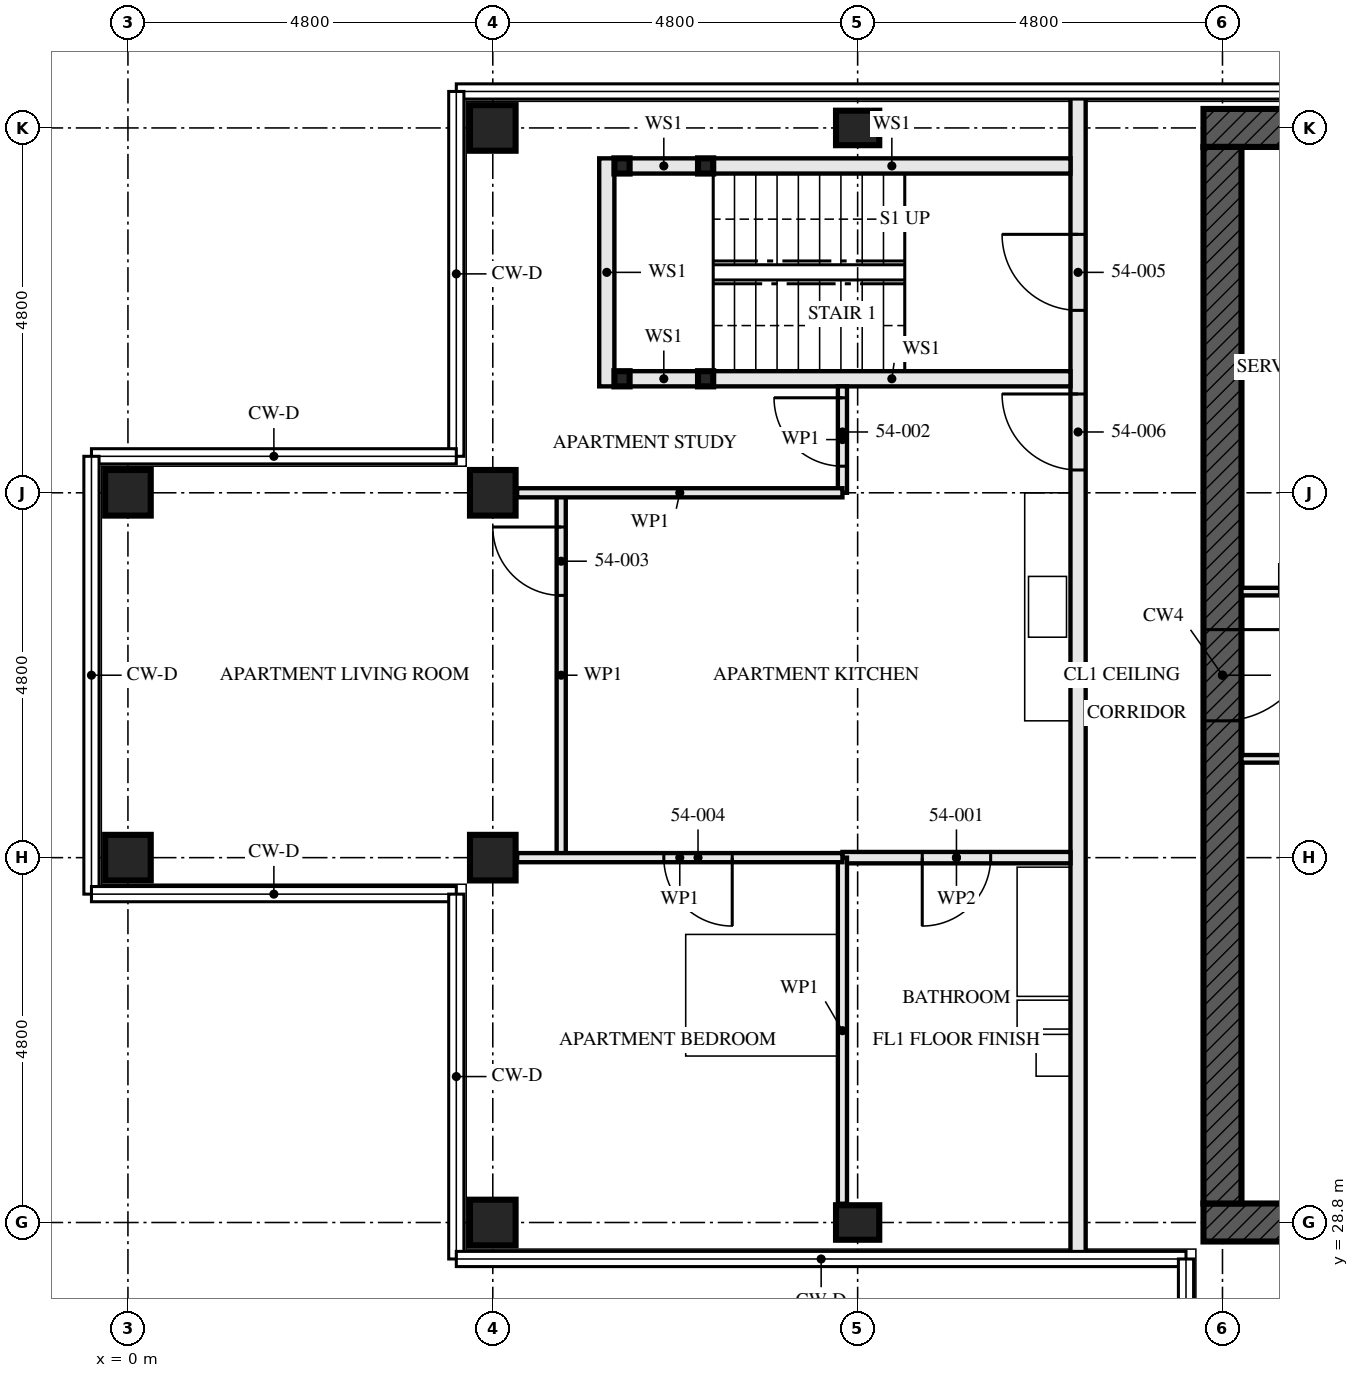
"""IFC4 building model, lengths in metres.
Left out: names, types, materials, properties, quantities, classifications, styles, units other than length and angle.
Written with IfcOpenShell. Run it as: python <this file> out.ifc"""

import sys

from ifc_helpers import new_model, si_unit, direction, frame, frame_2d, origin, origin_2d, place, context, subcontext, project, spatial, rectangle, hollow_rectangle, i_section, extrude, element, fill, save


model = new_model("IFC4")
c1 = context("Model", 3, precision=1e-05, world=origin(), true_north=direction((0.0, 1.0)))
c2 = subcontext(c1, "Body", "Model", "MODEL_VIEW")
j1 = project(units=[si_unit("LENGTHUNIT", "METRE"), si_unit("PLANEANGLEUNIT", "RADIAN")], contexts=[c1])
p1 = place(None, origin())
s1 = spatial("IfcSite", under=j1, at=p1, CompositionType="ELEMENT")
p2 = place(p1, origin())
s2 = spatial("IfcBuilding", under=s1, at=p2, CompositionType="ELEMENT")
p3 = place(p2, frame((0.0, 0.0, 198.0)))
s3 = spatial("IfcBuildingStorey", under=s2, at=p3, CompositionType="ELEMENT", Elevation=198.0)
for number, where, z_axis, x_axis in (
    (1, (0.0, 33.6, 0.0), (0.0, 0.0, 1.0), (0.0, 1.0, 0.0)),
    (2, (0.0, 38.4, 0.0), (0.0, 0.0, 1.0), (0.0, 1.0, 0.0)),
    (3, (4.8, 28.8, 0.0), (0.0, 0.0, 1.0), (0.0, 1.0, 0.0)),
    (4, (4.8, 33.6, 0.0), (0.0, 0.0, 1.0), (0.0, 1.0, 0.0)),
    (5, (4.8, 38.4, 0.0), (0.0, 0.0, 1.0), (0.0, 1.0, 0.0)),
    (6, (4.8, 43.2, 0.0), (0.0, 0.0, 1.0), (0.0, 1.0, 0.0)),
):
    element("IfcColumn", number, at=place(p3, frame(where, z_axis=z_axis, x_axis=x_axis)), inside=s3, PredefinedType="COLUMN", context=c2, shape_type="SweptSolid", body=[
        extrude(hollow_rectangle(XDim=0.6, YDim=0.6, WallThickness=0.05, at=origin_2d()), origin(), (0.0, 0.0, 1.0), 3.5),
    ])
for number, where, z_axis, x_axis in (
    (7, (9.6, 28.8, 0.0), (0.0, 0.0, 1.0), (0.0, 1.0, 0.0)),
    (8, (9.6, 43.2, 0.0), (0.0, 0.0, 1.0), (0.0, 1.0, 0.0)),
):
    element("IfcColumn", number, at=place(p3, frame(where, z_axis=z_axis, x_axis=x_axis)), inside=s3, PredefinedType="COLUMN", context=c2, shape_type="SweptSolid", body=[
        extrude(i_section(OverallWidth=0.454, OverallDepth=0.569, WebThickness=0.078, FlangeThickness=0.125, FilletRadius=0.015, at=origin_2d()), origin(), (0.0, 0.0, 1.0), 3.5),
    ])
p4 = place(p3, frame((14.15, 28.8, -0.17), z_axis=(0.0, 0.0, 1.0), x_axis=(1.0, 0.0, 0.0)))
e9 = element("IfcWall", 9, at=p4, inside=s3, PredefinedType="SHEAR", context=c2, shape_type="SweptSolid", body=[
    extrude(rectangle(XDim=14.9, YDim=0.5, at=frame_2d((7.45, 0.0))), origin(), (0.0, 0.0, 1.0), 3.5),
])
p5 = place(p4, frame((6.85, 0.0, 0.17)))
e10 = element("IfcOpeningElement", 10, at=p5, cuts=e9, PredefinedType="OPENING", context=c2, shape_type="SweptSolid", body=[
    extrude(rectangle(XDim=1.2, YDim=2.1, at=frame_2d((0.6, 1.05))), frame((0.0, 0.26, 0.0), z_axis=(0.0, -1.0, 0.0), x_axis=(1.0, 0.0, 0.0)), (0.0, 0.0, 1.0), 0.521),
])
p6 = place(p3, frame((29.05, 43.2, -0.17), z_axis=(0.0, 0.0, 1.0), x_axis=(-1.0, 0.0, 0.0)))
e11 = element("IfcWall", 11, at=p6, inside=s3, PredefinedType="SHEAR", context=c2, shape_type="SweptSolid", body=[
    extrude(rectangle(XDim=14.9, YDim=0.5, at=frame_2d((7.45, 0.0))), origin(), (0.0, 0.0, 1.0), 3.5),
])
p7 = place(p3, frame((14.4, 42.95, -0.17), z_axis=(0.0, 0.0, 1.0), x_axis=(0.0, -1.0, 0.0)))
e12 = element("IfcWall", 12, at=p7, inside=s3, PredefinedType="SHEAR", context=c2, shape_type="SweptSolid", body=[
    extrude(rectangle(XDim=13.9, YDim=0.5, at=frame_2d((6.95, 0.0))), origin(), (0.0, 0.0, 1.0), 3.5),
])
p8 = place(p7, frame((6.35, 0.0, 0.17)))
e13 = element("IfcOpeningElement", 13, at=p8, cuts=e12, PredefinedType="OPENING", context=c2, shape_type="SweptSolid", body=[
    extrude(rectangle(XDim=1.2, YDim=2.1, at=frame_2d((0.6, 1.05))), frame((0.0, 0.26, 0.0), z_axis=(0.0, -1.0, 0.0), x_axis=(1.0, 0.0, 0.0)), (0.0, 0.0, 1.0), 0.521),
])
for number, where, z_axis, x_axis in (
    (14, (6.5, 42.7, 0.0), (0.0, 0.0, 1.0), (1.0, 0.0, 0.0)),
    (15, (6.5, 39.9, 0.0), (0.0, 0.0, 1.0), (1.0, 0.0, 0.0)),
    (16, (7.6, 42.7, 0.0), (0.0, 0.0, 1.0), (1.0, 0.0, 0.0)),
    (17, (7.6, 39.9, 0.0), (0.0, 0.0, 1.0), (1.0, 0.0, 0.0)),
):
    element("IfcColumn", number, at=place(p3, frame(where, z_axis=z_axis, x_axis=x_axis)), inside=s3, PredefinedType="COLUMN", context=c2, shape_type="SweptSolid", body=[
        extrude(hollow_rectangle(XDim=0.2, YDim=0.2, WallThickness=0.008, at=origin_2d()), origin(), (0.0, 0.0, 1.0), 3.33),
    ])
p9 = place(p3, frame((6.6, 42.7, 0.0), z_axis=(0.0, 0.0, 1.0), x_axis=(1.0, 0.0, 0.0)))
e18 = element("IfcWall", 18, at=p9, inside=s3, PredefinedType="SOLIDWALL", context=c2, shape_type="SweptSolid", body=[
    extrude(rectangle(XDim=0.9, YDim=0.2, at=frame_2d((0.45, 0.0))), origin(), (0.0, 0.0, 1.0), 2.99),
])
p10 = place(p3, frame((7.7, 42.7, 0.0), z_axis=(0.0, 0.0, 1.0), x_axis=(1.0, 0.0, 0.0)))
e19 = element("IfcWall", 19, at=p10, inside=s3, PredefinedType="SOLIDWALL", context=c2, shape_type="SweptSolid", body=[
    extrude(rectangle(XDim=4.7, YDim=0.2, at=frame_2d((2.35, 0.0))), origin(), (0.0, 0.0, 1.0), 2.99),
])
p11 = place(p3, frame((6.6, 39.9, 0.0), z_axis=(0.0, 0.0, 1.0), x_axis=(1.0, 0.0, 0.0)))
e20 = element("IfcWall", 20, at=p11, inside=s3, PredefinedType="SOLIDWALL", context=c2, shape_type="SweptSolid", body=[
    extrude(rectangle(XDim=0.9, YDim=0.2, at=frame_2d((0.45, 0.0))), origin(), (0.0, 0.0, 1.0), 2.99),
])
p12 = place(p3, frame((7.7, 39.9, 0.0), z_axis=(0.0, 0.0, 1.0), x_axis=(1.0, 0.0, 0.0)))
e21 = element("IfcWall", 21, at=p12, inside=s3, PredefinedType="SOLIDWALL", context=c2, shape_type="SweptSolid", body=[
    extrude(rectangle(XDim=4.7, YDim=0.2, at=frame_2d((2.35, 0.0))), origin(), (0.0, 0.0, 1.0), 2.99),
])
p13 = place(p3, frame((6.3, 42.8, 0.0), z_axis=(0.0, 0.0, 1.0), x_axis=(0.0, -1.0, 0.0)))
e22 = element("IfcWall", 22, at=p13, inside=s3, PredefinedType="SOLIDWALL", context=c2, shape_type="SweptSolid", body=[
    extrude(rectangle(XDim=3.0, YDim=0.2, at=frame_2d((1.5, 0.0))), origin(), (0.0, 0.0, 1.0), 3.33),
])
p14 = place(p3, frame((9.4, 33.6, 0.0), z_axis=(0.0, 0.0, 1.0), x_axis=(1.0, 0.0, 0.0)))
e23 = element("IfcWall", 23, at=p14, inside=s3, PredefinedType="PARTITIONING", context=c2, shape_type="SweptSolid", body=[
    extrude(rectangle(XDim=3.0, YDim=0.15, at=frame_2d((1.5, 0.0))), origin(), (0.0, 0.0, 1.0), 2.55),
])
p15 = place(p14, frame((1.05, 0.0, 0.0)))
e24 = element("IfcOpeningElement", 24, at=p15, cuts=e23, PredefinedType="OPENING", context=c2, shape_type="SweptSolid", body=[
    extrude(rectangle(XDim=0.9, YDim=2.1, at=frame_2d((0.45, 1.05))), frame((0.0, 0.085, 0.0), z_axis=(0.0, -1.0, 0.0), x_axis=(1.0, 0.0, 0.0)), (0.0, 0.0, 1.0), 0.171),
])
p16 = place(p3, frame((9.4, 39.8, 0.0), z_axis=(0.0, 0.0, 1.0), x_axis=(0.0, -1.0, 0.0)))
e25 = element("IfcWall", 25, at=p16, inside=s3, PredefinedType="PARTITIONING", context=c2, shape_type="SweptSolid", body=[
    extrude(rectangle(XDim=1.4, YDim=0.12, at=frame_2d((0.7, 0.0))), origin(), (0.0, 0.0, 1.0), 3.33),
])
p17 = place(p16, frame((0.15, 0.0, 0.0)))
e26 = element("IfcOpeningElement", 26, at=p17, cuts=e25, PredefinedType="OPENING", context=c2, shape_type="SweptSolid", body=[
    extrude(rectangle(XDim=0.9, YDim=2.1, at=frame_2d((0.45, 1.05))), frame((0.0, 0.071, 0.0), z_axis=(0.0, -1.0, 0.0), x_axis=(1.0, 0.0, 0.0)), (0.0, 0.0, 1.0), 0.141),
])
p18 = place(p3, frame((5.7, 38.4, 0.0), z_axis=(0.0, 0.0, 1.0), x_axis=(0.0, -1.0, 0.0)))
e27 = element("IfcWall", 27, at=p18, inside=s3, PredefinedType="PARTITIONING", context=c2, shape_type="SweptSolid", body=[
    extrude(rectangle(XDim=4.8, YDim=0.12, at=frame_2d((2.4, 0.0))), origin(), (0.0, 0.0, 1.0), 3.33),
])
p19 = place(p18, frame((0.45, 0.0, 0.0)))
e28 = element("IfcOpeningElement", 28, at=p19, cuts=e27, PredefinedType="OPENING", context=c2, shape_type="SweptSolid", body=[
    extrude(rectangle(XDim=0.9, YDim=2.1, at=frame_2d((0.45, 1.05))), frame((0.0, 0.071, 0.0), z_axis=(0.0, -1.0, 0.0), x_axis=(1.0, 0.0, 0.0)), (0.0, 0.0, 1.0), 0.141),
])
p20 = place(p3, frame((9.4, 33.6, 0.0), z_axis=(0.0, 0.0, 1.0), x_axis=(0.0, -1.0, 0.0)))
e29 = element("IfcWall", 29, at=p20, inside=s3, PredefinedType="PARTITIONING", context=c2, shape_type="SweptSolid", body=[
    extrude(rectangle(XDim=4.553, YDim=0.12, at=frame_2d((2.276, 0.0))), origin(), (0.0, 0.0, 1.0), 3.33),
])
p21 = place(p3, frame((5.12, 38.4, 0.0), z_axis=(0.0, 0.0, 1.0), x_axis=(1.0, 0.0, 0.0)))
e30 = element("IfcWall", 30, at=p21, inside=s3, PredefinedType="PARTITIONING", context=c2, shape_type="SweptSolid", body=[
    extrude(rectangle(XDim=4.28, YDim=0.12, at=frame_2d((2.14, 0.0))), origin(), (0.0, 0.0, 1.0), 2.55),
])
p22 = place(p3, frame((5.12, 33.6, 0.0), z_axis=(0.0, 0.0, 1.0), x_axis=(1.0, 0.0, 0.0)))
e31 = element("IfcWall", 31, at=p22, inside=s3, PredefinedType="PARTITIONING", context=c2, shape_type="SweptSolid", body=[
    extrude(rectangle(XDim=4.28, YDim=0.12, at=frame_2d((2.14, 0.0))), origin(), (0.0, 0.0, 1.0), 2.55),
])
p23 = place(p22, frame((1.93, 0.0, 0.0)))
e32 = element("IfcOpeningElement", 32, at=p23, cuts=e31, PredefinedType="OPENING", context=c2, shape_type="SweptSolid", body=[
    extrude(rectangle(XDim=0.9, YDim=2.1, at=frame_2d((0.45, 1.05))), frame((0.0, 0.071, 0.0), z_axis=(0.0, -1.0, 0.0), x_axis=(1.0, 0.0, 0.0)), (0.0, 0.0, 1.0), 0.141),
])
p24 = place(p3, frame((12.5, 43.655, 0.0), z_axis=(0.0, 0.0, 1.0), x_axis=(0.0, -1.0, 0.0)))
e33 = element("IfcWall", 33, at=p24, inside=s3, PredefinedType="PARTITIONING", context=c2, shape_type="SweptSolid", body=[
    extrude(rectangle(XDim=15.31, YDim=0.2, at=frame_2d((7.655, 0.0))), origin(), (0.0, 0.0, 1.0), 2.32),
])
p25 = place(p24, frame((1.855, 0.0, 0.0)))
e34 = element("IfcOpeningElement", 34, at=p25, cuts=e33, PredefinedType="OPENING", context=c2, shape_type="SweptSolid", body=[
    extrude(rectangle(XDim=1.0, YDim=2.1, at=frame_2d((0.5, 1.05))), frame((0.0, 0.111, 0.0), z_axis=(0.0, -1.0, 0.0), x_axis=(1.0, 0.0, 0.0)), (0.0, 0.0, 1.0), 0.221),
])
p26 = place(p24, frame((3.955, 0.0, 0.0)))
e35 = element("IfcOpeningElement", 35, at=p26, cuts=e33, PredefinedType="OPENING", context=c2, shape_type="SweptSolid", body=[
    extrude(rectangle(XDim=1.0, YDim=2.1, at=frame_2d((0.5, 1.05))), frame((0.0, 0.111, 0.0), z_axis=(0.0, -1.0, 0.0), x_axis=(1.0, 0.0, 0.0)), (0.0, 0.0, 1.0), 0.221),
])
p27 = place(p3, frame((14.65, 34.9, 0.0), z_axis=(0.0, 0.0, 1.0), x_axis=(1.0, 0.0, 0.0)))
e36 = element("IfcWall", 36, at=p27, inside=s3, PredefinedType="SOLIDWALL", context=c2, shape_type="SweptSolid", body=[
    extrude(rectangle(XDim=5.9, YDim=0.1, at=frame_2d((2.95, 0.0))), origin(), (0.0, 0.0, 1.0), 3.33),
])
p28 = place(p27, frame((1.6, 0.0, 0.0)))
e37 = element("IfcOpeningElement", 37, at=p28, cuts=e36, PredefinedType="OPENING", context=c2, shape_type="SweptSolid", body=[
    extrude(rectangle(XDim=0.7, YDim=2.1, at=frame_2d((0.35, 1.05))), frame((0.0, 0.061, 0.0), z_axis=(0.0, -1.0, 0.0), x_axis=(1.0, 0.0, 0.0)), (0.0, 0.0, 1.0), 0.121),
])
p29 = place(p3, frame((14.65, 37.1, 0.0), z_axis=(0.0, 0.0, 1.0), x_axis=(1.0, 0.0, 0.0)))
e38 = element("IfcWall", 38, at=p29, inside=s3, PredefinedType="SOLIDWALL", context=c2, shape_type="SweptSolid", body=[
    extrude(rectangle(XDim=5.9, YDim=0.1, at=frame_2d((2.95, 0.0))), origin(), (0.0, 0.0, 1.0), 3.33),
])
p30 = place(p29, frame((0.5, 0.0, 0.0)))
e39 = element("IfcOpeningElement", 39, at=p30, cuts=e38, PredefinedType="OPENING", context=c2, shape_type="SweptSolid", body=[
    extrude(rectangle(XDim=0.7, YDim=2.1, at=frame_2d((0.35, 1.05))), frame((0.0, 0.061, 0.0), z_axis=(0.0, -1.0, 0.0), x_axis=(1.0, 0.0, 0.0)), (0.0, 0.0, 1.0), 0.121),
])
p31 = place(p29, frame((1.9, 0.0, 0.0)))
e40 = element("IfcOpeningElement", 40, at=p31, cuts=e38, PredefinedType="OPENING", context=c2, shape_type="SweptSolid", body=[
    extrude(rectangle(XDim=0.9, YDim=2.1, at=frame_2d((0.45, 1.05))), frame((0.0, 0.061, 0.0), z_axis=(0.0, -1.0, 0.0), x_axis=(1.0, 0.0, 0.0)), (0.0, 0.0, 1.0), 0.121),
])
p32 = place(p15, frame((0.9, 0.0, 0.0), z_axis=(0.0, 0.0, 1.0), x_axis=(-1.0, 0.0, 0.0)))
e41 = element("IfcDoor", 41, at=p32, inside=s3, OperationType="SINGLE_SWING_LEFT", PredefinedType="DOOR", context=c2, shape_type="SweptSolid", body=[
    extrude(rectangle(XDim=0.9, YDim=2.1, at=frame_2d((0.45, 1.05))), frame((0.0, 0.022, 0.0), z_axis=(0.0, -1.0, 0.0), x_axis=(1.0, 0.0, 0.0)), (0.0, 0.0, 1.0), 0.044),
])
fill(e24, e41)
p33 = place(p17, frame((0.9, 0.0, 0.0), z_axis=(0.0, 0.0, 1.0), x_axis=(-1.0, 0.0, 0.0)))
e42 = element("IfcDoor", 42, at=p33, inside=s3, OperationType="SINGLE_SWING_LEFT", PredefinedType="DOOR", context=c2, shape_type="SweptSolid", body=[
    extrude(rectangle(XDim=0.9, YDim=2.1, at=frame_2d((0.45, 1.05))), frame((0.0, 0.022, 0.0), z_axis=(0.0, -1.0, 0.0), x_axis=(1.0, 0.0, 0.0)), (0.0, 0.0, 1.0), 0.044),
])
fill(e26, e42)
p34 = place(p19, frame((0.9, 0.0, 0.0), z_axis=(0.0, 0.0, 1.0), x_axis=(-1.0, 0.0, 0.0)))
e43 = element("IfcDoor", 43, at=p34, inside=s3, OperationType="SINGLE_SWING_LEFT", PredefinedType="DOOR", context=c2, shape_type="SweptSolid", body=[
    extrude(rectangle(XDim=0.9, YDim=2.1, at=frame_2d((0.45, 1.05))), frame((0.0, 0.022, 0.0), z_axis=(0.0, -1.0, 0.0), x_axis=(1.0, 0.0, 0.0)), (0.0, 0.0, 1.0), 0.044),
])
fill(e28, e43)
p35 = place(p23, frame((0.9, 0.0, 0.0), z_axis=(0.0, 0.0, 1.0), x_axis=(-1.0, 0.0, 0.0)))
e44 = element("IfcDoor", 44, at=p35, inside=s3, OperationType="SINGLE_SWING_RIGHT", PredefinedType="DOOR", context=c2, shape_type="SweptSolid", body=[
    extrude(rectangle(XDim=0.9, YDim=2.1, at=frame_2d((0.45, 1.05))), frame((0.0, 0.022, 0.0), z_axis=(0.0, -1.0, 0.0), x_axis=(1.0, 0.0, 0.0)), (0.0, 0.0, 1.0), 0.044),
])
fill(e32, e44)
p36 = place(p25, frame((1.0, 0.0, 0.0), z_axis=(0.0, 0.0, 1.0), x_axis=(-1.0, 0.0, 0.0)))
e45 = element("IfcDoor", 45, at=p36, inside=s3, OperationType="SINGLE_SWING_LEFT", PredefinedType="DOOR", context=c2, shape_type="SweptSolid", body=[
    extrude(rectangle(XDim=1.0, YDim=2.1, at=frame_2d((0.5, 1.05))), frame((0.0, 0.032, 0.0), z_axis=(0.0, -1.0, 0.0), x_axis=(1.0, 0.0, 0.0)), (0.0, 0.0, 1.0), 0.064),
])
fill(e34, e45)
p37 = place(p26, frame((1.0, 0.0, 0.0), z_axis=(0.0, 0.0, 1.0), x_axis=(-1.0, 0.0, 0.0)))
e46 = element("IfcDoor", 46, at=p37, inside=s3, OperationType="SINGLE_SWING_LEFT", PredefinedType="DOOR", context=c2, shape_type="SweptSolid", body=[
    extrude(rectangle(XDim=1.0, YDim=2.1, at=frame_2d((0.5, 1.05))), frame((0.0, 0.027, 0.0), z_axis=(0.0, -1.0, 0.0), x_axis=(1.0, 0.0, 0.0)), (0.0, 0.0, 1.0), 0.054),
])
fill(e35, e46)
p38 = place(p8, origin())
e47 = element("IfcDoor", 47, at=p38, inside=s3, OperationType="SINGLE_SWING_LEFT", PredefinedType="DOOR", context=c2, shape_type="SweptSolid", body=[
    extrude(rectangle(XDim=1.2, YDim=2.1, at=frame_2d((0.6, 1.05))), frame((0.0, 0.027, 0.0), z_axis=(0.0, -1.0, 0.0), x_axis=(1.0, 0.0, 0.0)), (0.0, 0.0, 1.0), 0.054),
])
fill(e13, e47)
save(model, sys.argv[1])
